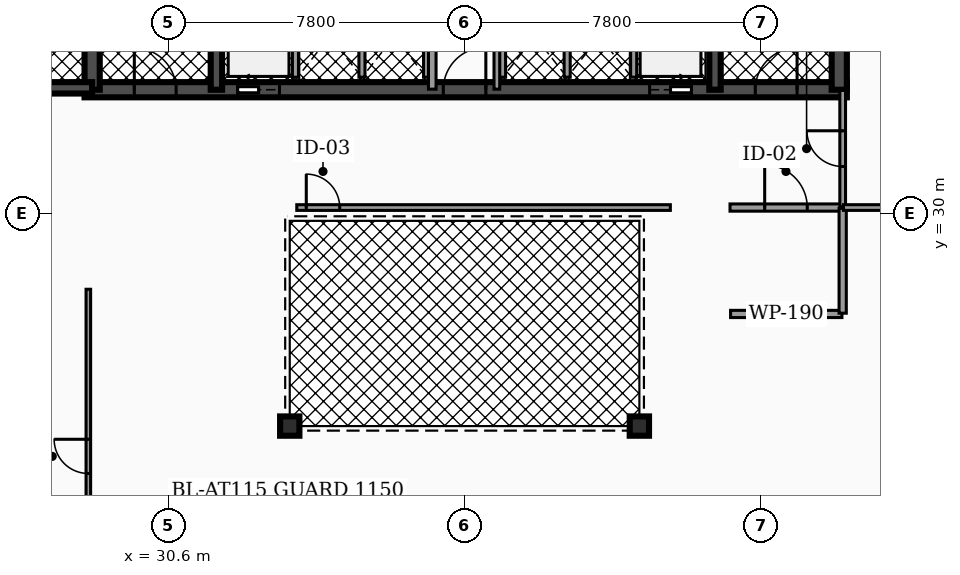
"""IFC4 building model, lengths in metres.
Left out: names, types, materials, properties, quantities, classifications, styles, units other than length and angle.
Written with IfcOpenShell. Run it as: python <this file> out.ifc"""

import sys

from ifc_helpers import new_model, si_unit, direction, frame, frame_2d, origin, origin_2d, place, context, subcontext, project, spatial, rectangle, hollow_circle, extrude, element, fill, save


model = new_model("IFC4")
c1 = context("Model", 3, precision=1e-05, world=origin(), true_north=direction((0.0, 1.0)))
c2 = subcontext(c1, "Body", "Model", "MODEL_VIEW")
j1 = project(units=[si_unit("LENGTHUNIT", "METRE"), si_unit("PLANEANGLEUNIT", "RADIAN")], contexts=[c1])
p1 = place(None, origin())
s1 = spatial("IfcSite", under=j1, at=p1, CompositionType="ELEMENT")
p2 = place(p1, origin())
s2 = spatial("IfcBuilding", under=s1, at=p2, CompositionType="ELEMENT")
p3 = place(p2, frame((0.0, 0.0, 35.7)))
s3 = spatial("IfcBuildingStorey", under=s2, at=p3, CompositionType="ELEMENT", Elevation=35.7)
p4 = place(p3, frame((28.4, 33.25, 0.0), z_axis=(0.0, 0.0, 1.0), x_axis=(1.0, 0.0, 0.0)))
e1 = element("IfcWall", 1, at=p4, inside=s3, PredefinedType="SHEAR", context=c2, shape_type="SweptSolid", body=[
    extrude(rectangle(XDim=20.06, YDim=0.4, at=frame_2d((10.03, 0.0))), origin(), (0.0, 0.0, 1.0), 3.82),
])
p5 = place(p4, frame((4.03, 0.0, 0.0)))
e2 = element("IfcOpeningElement", 2, at=p5, cuts=e1, PredefinedType="OPENING", context=c2, shape_type="SweptSolid", body=[
    extrude(rectangle(XDim=1.1, YDim=2.15, at=frame_2d((0.55, 1.075))), frame((0.0, 0.21, 0.0), z_axis=(0.0, -1.0, 0.0), x_axis=(1.0, 0.0, 0.0)), (0.0, 0.0, 1.0), 0.42),
])
p6 = place(p4, frame((14.87, 0.0, 0.0)))
e3 = element("IfcOpeningElement", 3, at=p6, cuts=e1, PredefinedType="OPENING", context=c2, shape_type="SweptSolid", body=[
    extrude(rectangle(XDim=1.1, YDim=2.15, at=frame_2d((0.55, 1.075))), frame((0.0, 0.21, 0.0), z_axis=(0.0, -1.0, 0.0), x_axis=(1.0, 0.0, 0.0)), (0.0, 0.0, 1.0), 0.42),
])
p7 = place(p4, frame((1.31, 0.0, 0.0)))
e4 = element("IfcOpeningElement", 4, at=p7, cuts=e1, PredefinedType="OPENING", context=c2, shape_type="SweptSolid", body=[
    extrude(rectangle(XDim=1.1, YDim=2.2, at=frame_2d((0.55, 1.1))), frame((0.0, 0.21, 0.0), z_axis=(0.0, -1.0, 0.0), x_axis=(1.0, 0.0, 0.0)), (0.0, 0.0, 1.0), 0.42),
])
p8 = place(p4, frame((9.44, 0.0, 0.0)))
e5 = element("IfcOpeningElement", 5, at=p8, cuts=e1, PredefinedType="OPENING", context=c2, shape_type="SweptSolid", body=[
    extrude(rectangle(XDim=1.12, YDim=2.05, at=frame_2d((0.56, 1.025))), frame((0.0, 0.21, 0.0), z_axis=(0.0, -1.0, 0.0), x_axis=(1.0, 0.0, 0.0)), (0.0, 0.0, 1.0), 0.42),
])
p9 = place(p4, frame((17.65, 0.0, 0.0)))
e6 = element("IfcOpeningElement", 6, at=p9, cuts=e1, PredefinedType="OPENING", context=c2, shape_type="SweptSolid", body=[
    extrude(rectangle(XDim=1.1, YDim=2.2, at=frame_2d((0.55, 1.1))), frame((0.0, 0.21, 0.0), z_axis=(0.0, -1.0, 0.0), x_axis=(1.0, 0.0, 0.0)), (0.0, 0.0, 1.0), 0.42),
])
p10 = place(p3, frame((28.6, 33.25, 0.0), z_axis=(0.0, 0.0, 1.0), x_axis=(0.0, 1.0, 0.0)))
e7 = element("IfcWall", 7, at=p10, inside=s3, PredefinedType="SHEAR", context=c2, shape_type="SweptSolid", body=[
    extrude(rectangle(XDim=10.2, YDim=0.4, at=frame_2d((5.1, 0.0))), origin(), (0.0, 0.0, 1.0), 3.82),
])
for number, where, z_axis, x_axis in (
    (8, (31.87, 33.25, 0.0), (0.0, 0.0, 1.0), (0.0, 1.0, 0.0)),
    (9, (44.99, 33.25, 0.0), (0.0, 0.0, 1.0), (0.0, 1.0, 0.0)),
):
    element("IfcWall", number, at=place(p3, frame(where, z_axis=z_axis, x_axis=x_axis)), inside=s3, PredefinedType="SHEAR", context=c2, shape_type="SweptSolid", body=[
        extrude(rectangle(XDim=10.2, YDim=0.3, at=frame_2d((5.1, 0.0))), origin(), (0.0, 0.0, 1.0), 3.82),
    ])
p11 = place(p3, frame((48.26, 33.25, 0.0), z_axis=(0.0, 0.0, 1.0), x_axis=(0.0, 1.0, 0.0)))
e10 = element("IfcWall", 10, at=p11, inside=s3, PredefinedType="SHEAR", context=c2, shape_type="SweptSolid", body=[
    extrude(rectangle(XDim=10.2, YDim=0.4, at=frame_2d((5.1, 0.0))), origin(), (0.0, 0.0, 1.0), 3.82),
])
p12 = place(p3, frame((25.08, 33.3, 0.0), z_axis=(0.0, 0.0, 1.0), x_axis=(1.0, 0.0, 0.0)))
e11 = element("IfcWall", 11, at=p12, inside=s3, PredefinedType="SHEAR", context=c2, shape_type="SweptSolid", body=[
    extrude(rectangle(XDim=3.52, YDim=0.3, at=frame_2d((1.76, 0.0))), origin(), (0.0, 0.0, 1.0), 3.82),
])
p13 = place(p12, frame((1.335, 0.0, 0.0)))
e12 = element("IfcOpeningElement", 12, at=p13, cuts=e11, PredefinedType="OPENING", context=c2, shape_type="SweptSolid", body=[
    extrude(rectangle(XDim=0.95, YDim=2.2, at=frame_2d((0.475, 1.1))), frame((0.0, 0.16, 0.0), z_axis=(0.0, -1.0, 0.0), x_axis=(1.0, 0.0, 0.0)), (0.0, 0.0, 1.0), 0.32),
])
for number, where, z_axis, x_axis in (
    (13, (33.8, 24.4, 0.0), (0.0, 0.0, 1.0), (1.0, 0.0, 0.0)),
    (14, (43.0, 24.4, 0.0), (0.0, 0.0, 1.0), (1.0, 0.0, 0.0)),
):
    element("IfcColumn", number, at=place(p3, frame(where, z_axis=z_axis, x_axis=x_axis)), inside=s3, PredefinedType="COLUMN", context=c2, shape_type="SweptSolid", body=[
        extrude(hollow_circle(Radius=0.254, WallThickness=0.02, at=origin_2d()), origin(), (0.0, 0.0, 1.0), 3.82),
    ])
for number, where, z_axis, x_axis in (
    (15, (33.95, 33.58, 0.0), (0.0, 0.0, 1.0), (0.0, 1.0, 0.0)),
    (16, (42.85, 33.58, 0.0), (0.0, 0.0, 1.0), (0.0, 1.0, 0.0)),
):
    element("IfcWall", number, at=place(p3, frame(where, z_axis=z_axis, x_axis=x_axis)), inside=s3, PredefinedType="SOLIDWALL", context=c2, shape_type="SweptSolid", body=[
        extrude(rectangle(XDim=2.45, YDim=0.16, at=frame_2d((1.225, 0.0))), origin(), (0.0, 0.0, 1.0), 2.792),
    ])
for number, where, z_axis, x_axis in (
    (17, (35.7, 33.58, 0.0), (0.0, 0.0, 1.0), (0.0, 1.0, 0.0)),
    (18, (37.4, 33.58, 0.0), (0.0, 0.0, 1.0), (0.0, 1.0, 0.0)),
    (19, (39.4, 33.58, 0.0), (0.0, 0.0, 1.0), (0.0, 1.0, 0.0)),
    (20, (41.1, 33.58, 0.0), (0.0, 0.0, 1.0), (0.0, 1.0, 0.0)),
):
    element("IfcWall", number, at=place(p3, frame(where, z_axis=z_axis, x_axis=x_axis)), inside=s3, PredefinedType="SOLIDWALL", context=c2, shape_type="SweptSolid", body=[
        extrude(rectangle(XDim=2.25, YDim=0.16, at=frame_2d((1.125, 0.0))), origin(), (0.0, 0.0, 1.0), 2.792),
    ])
p14 = place(p3, frame((37.55, 33.265, 0.0), z_axis=(0.0, 0.0, 1.0), x_axis=(0.0, 1.0, 0.0)))
e21 = element("IfcWall", 21, at=p14, inside=s3, PredefinedType="PARTITIONING", context=c2, shape_type="SweptSolid", body=[
    extrude(rectangle(XDim=4.595, YDim=0.2, at=frame_2d((2.298, 0.0))), origin(), (0.0, 0.0, 1.0), 2.777),
])
p15 = place(p14, frame((3.058, 0.0, 0.0)))
e22 = element("IfcOpeningElement", 22, at=p15, cuts=e21, PredefinedType="OPENING", context=c2, shape_type="SweptSolid", body=[
    extrude(rectangle(XDim=0.88, YDim=2.05, at=frame_2d((0.44, 1.025))), frame((0.0, 0.11, 0.0), z_axis=(0.0, -1.0, 0.0), x_axis=(1.0, 0.0, 0.0)), (0.0, 0.0, 1.0), 0.22),
])
p16 = place(p3, frame((39.25, 33.265, 0.0), z_axis=(0.0, 0.0, 1.0), x_axis=(0.0, 1.0, 0.0)))
e23 = element("IfcWall", 23, at=p16, inside=s3, PredefinedType="PARTITIONING", context=c2, shape_type="SweptSolid", body=[
    extrude(rectangle(XDim=4.595, YDim=0.15, at=frame_2d((2.298, 0.0))), origin(), (0.0, 0.0, 1.0), 2.777),
])
p17 = place(p16, frame((3.028, 0.0, 0.0)))
e24 = element("IfcOpeningElement", 24, at=p17, cuts=e23, PredefinedType="OPENING", context=c2, shape_type="SweptSolid", body=[
    extrude(rectangle(XDim=0.94, YDim=2.05, at=frame_2d((0.47, 1.025))), frame((0.0, 0.085, 0.0), z_axis=(0.0, -1.0, 0.0), x_axis=(1.0, 0.0, 0.0)), (0.0, 0.0, 1.0), 0.17),
])
p18 = place(p3, frame((45.385, 30.15, 0.0), z_axis=(0.0, 0.0, 1.0), x_axis=(1.0, 0.0, 0.0)))
e25 = element("IfcWall", 25, at=p18, inside=s3, PredefinedType="PARTITIONING", context=c2, shape_type="SweptSolid", body=[
    extrude(rectangle(XDim=2.945, YDim=0.19, at=frame_2d((1.473, 0.0))), origin(), (0.0, 0.0, 1.0), 2.777),
])
p19 = place(p18, frame((0.913, 0.0, 0.0)))
e26 = element("IfcOpeningElement", 26, at=p19, cuts=e25, PredefinedType="OPENING", context=c2, shape_type="SweptSolid", body=[
    extrude(rectangle(XDim=1.12, YDim=2.05, at=frame_2d((0.56, 1.025))), frame((0.0, 0.105, 0.0), z_axis=(0.0, -1.0, 0.0), x_axis=(1.0, 0.0, 0.0)), (0.0, 0.0, 1.0), 0.21),
])
p20 = place(p3, frame((48.35, 30.17, 0.0), z_axis=(0.0, 0.0, 1.0), x_axis=(0.0, 1.0, 0.0)))
e27 = element("IfcWall", 27, at=p20, inside=s3, PredefinedType="PARTITIONING", context=c2, shape_type="SweptSolid", body=[
    extrude(rectangle(XDim=3.06, YDim=0.15, at=frame_2d((1.53, 0.0))), origin(), (0.0, 0.0, 1.0), 2.777),
])
p21 = place(p20, frame((1.06, 0.0, 0.0)))
e28 = element("IfcOpeningElement", 28, at=p21, cuts=e27, PredefinedType="OPENING", context=c2, shape_type="SweptSolid", body=[
    extrude(rectangle(XDim=0.94, YDim=2.05, at=frame_2d((0.47, 1.025))), frame((0.0, 0.085, 0.0), z_axis=(0.0, -1.0, 0.0), x_axis=(1.0, 0.0, 0.0)), (0.0, 0.0, 1.0), 0.17),
])
p22 = place(p3, frame((33.985, 30.15, 0.0), z_axis=(0.0, 0.0, 1.0), x_axis=(1.0, 0.0, 0.0)))
e29 = element("IfcWall", 29, at=p22, inside=s3, PredefinedType="PARTITIONING", context=c2, shape_type="SweptSolid", body=[
    extrude(rectangle(XDim=9.83, YDim=0.15, at=frame_2d((4.915, 0.0))), origin(), (0.0, 0.0, 1.0), 2.777),
])
p23 = place(p22, frame((0.25, 0.0, 0.0)))
e30 = element("IfcOpeningElement", 30, at=p23, cuts=e29, PredefinedType="OPENING", context=c2, shape_type="SweptSolid", body=[
    extrude(rectangle(XDim=0.88, YDim=2.05, at=frame_2d((0.44, 1.025))), frame((0.0, 0.085, 0.0), z_axis=(0.0, -1.0, 0.0), x_axis=(1.0, 0.0, 0.0)), (0.0, 0.0, 1.0), 0.17),
])
p24 = place(p3, frame((45.4, 27.35, 0.0), z_axis=(0.0, 0.0, 1.0), x_axis=(1.0, 0.0, 0.0)))
e31 = element("IfcWall", 31, at=p24, inside=s3, PredefinedType="PARTITIONING", context=c2, shape_type="SweptSolid", body=[
    extrude(rectangle(XDim=2.93, YDim=0.19, at=frame_2d((1.465, 0.0))), origin(), (0.0, 0.0, 1.0), 2.777),
])
p25 = place(p3, frame((48.35, 27.37, 0.0), z_axis=(0.0, 0.0, 1.0), x_axis=(0.0, 1.0, 0.0)))
e32 = element("IfcWall", 32, at=p25, inside=s3, PredefinedType="PARTITIONING", context=c2, shape_type="SweptSolid", body=[
    extrude(rectangle(XDim=2.76, YDim=0.19, at=frame_2d((1.38, 0.0))), origin(), (0.0, 0.0, 1.0), 2.777),
])
p26 = place(p3, frame((48.37, 30.15, 0.0), z_axis=(0.0, 0.0, 1.0), x_axis=(1.0, 0.0, 0.0)))
e33 = element("IfcWall", 33, at=p26, inside=s3, PredefinedType="PARTITIONING", context=c2, shape_type="SweptSolid", body=[
    extrude(rectangle(XDim=2.06, YDim=0.15, at=frame_2d((1.03, 0.0))), origin(), (0.0, 0.0, 1.0), 2.777),
])
p27 = place(p3, frame((28.5, 19.205, 0.0), z_axis=(0.0, 0.0, 1.0), x_axis=(0.0, 1.0, 0.0)))
e34 = element("IfcWall", 34, at=p27, inside=s3, PredefinedType="PARTITIONING", context=c2, shape_type="SweptSolid", body=[
    extrude(rectangle(XDim=8.795, YDim=0.12, at=frame_2d((4.397, 0.0))), origin(), (0.0, 0.0, 1.0), 2.777),
])
p28 = place(p27, frame((3.947, 0.0, 0.0)))
e35 = element("IfcOpeningElement", 35, at=p28, cuts=e34, PredefinedType="OPENING", context=c2, shape_type="SweptSolid", body=[
    extrude(rectangle(XDim=0.9, YDim=2.05, at=frame_2d((0.45, 1.025))), frame((0.0, 0.07, 0.0), z_axis=(0.0, -1.0, 0.0), x_axis=(1.0, 0.0, 0.0)), (0.0, 0.0, 1.0), 0.14),
])
p29 = place(p5, origin())
e36 = element("IfcDoor", 36, at=p29, inside=s3, OperationType="SLIDING_TO_LEFT", PredefinedType="DOOR", context=c2, shape_type="SweptSolid", body=[
    extrude(rectangle(XDim=1.1, YDim=2.15, at=frame_2d((0.55, 1.075))), frame((0.0, 0.025, 0.0), z_axis=(0.0, -1.0, 0.0), x_axis=(1.0, 0.0, 0.0)), (0.0, 0.0, 1.0), 0.05),
])
fill(e2, e36)
p30 = place(p6, origin())
e37 = element("IfcDoor", 37, at=p30, inside=s3, OperationType="SLIDING_TO_RIGHT", PredefinedType="DOOR", context=c2, shape_type="SweptSolid", body=[
    extrude(rectangle(XDim=1.1, YDim=2.15, at=frame_2d((0.55, 1.075))), frame((0.0, 0.025, 0.0), z_axis=(0.0, -1.0, 0.0), x_axis=(1.0, 0.0, 0.0)), (0.0, 0.0, 1.0), 0.05),
])
fill(e3, e37)
p31 = place(p7, origin())
e38 = element("IfcDoor", 38, at=p31, inside=s3, OperationType="SINGLE_SWING_LEFT", PredefinedType="DOOR", context=c2, shape_type="SweptSolid", body=[
    extrude(rectangle(XDim=1.1, YDim=2.2, at=frame_2d((0.55, 1.1))), frame((0.0, 0.025, 0.0), z_axis=(0.0, -1.0, 0.0), x_axis=(1.0, 0.0, 0.0)), (0.0, 0.0, 1.0), 0.05),
])
fill(e4, e38)
p32 = place(p8, origin())
e39 = element("IfcDoor", 39, at=p32, inside=s3, OperationType="SINGLE_SWING_RIGHT", PredefinedType="DOOR", context=c2, shape_type="SweptSolid", body=[
    extrude(rectangle(XDim=1.12, YDim=2.05, at=frame_2d((0.56, 1.025))), frame((0.0, 0.025, 0.0), z_axis=(0.0, -1.0, 0.0), x_axis=(1.0, 0.0, 0.0)), (0.0, 0.0, 1.0), 0.05),
])
fill(e5, e39)
p33 = place(p9, origin())
e40 = element("IfcDoor", 40, at=p33, inside=s3, OperationType="SINGLE_SWING_RIGHT", PredefinedType="DOOR", context=c2, shape_type="SweptSolid", body=[
    extrude(rectangle(XDim=1.1, YDim=2.2, at=frame_2d((0.55, 1.1))), frame((0.0, 0.025, 0.0), z_axis=(0.0, -1.0, 0.0), x_axis=(1.0, 0.0, 0.0)), (0.0, 0.0, 1.0), 0.05),
])
fill(e6, e40)
p34 = place(p19, origin())
e41 = element("IfcDoor", 41, at=p34, inside=s3, OperationType="SINGLE_SWING_LEFT", PredefinedType="DOOR", context=c2, shape_type="SweptSolid", body=[
    extrude(rectangle(XDim=1.12, YDim=2.05, at=frame_2d((0.56, 1.025))), frame((0.0, 0.025, 0.0), z_axis=(0.0, -1.0, 0.0), x_axis=(1.0, 0.0, 0.0)), (0.0, 0.0, 1.0), 0.05),
])
fill(e26, e41)
p35 = place(p21, origin())
e42 = element("IfcDoor", 42, at=p35, inside=s3, OperationType="SINGLE_SWING_RIGHT", PredefinedType="DOOR", context=c2, shape_type="SweptSolid", body=[
    extrude(rectangle(XDim=0.94, YDim=2.05, at=frame_2d((0.47, 1.025))), frame((0.0, 0.025, 0.0), z_axis=(0.0, -1.0, 0.0), x_axis=(1.0, 0.0, 0.0)), (0.0, 0.0, 1.0), 0.05),
])
fill(e28, e42)
p36 = place(p23, origin())
e43 = element("IfcDoor", 43, at=p36, inside=s3, OperationType="SINGLE_SWING_LEFT", PredefinedType="DOOR", context=c2, shape_type="SweptSolid", body=[
    extrude(rectangle(XDim=0.88, YDim=2.05, at=frame_2d((0.44, 1.025))), frame((0.0, 0.025, 0.0), z_axis=(0.0, -1.0, 0.0), x_axis=(1.0, 0.0, 0.0)), (0.0, 0.0, 1.0), 0.05),
])
fill(e30, e43)
p37 = place(p28, origin())
e44 = element("IfcDoor", 44, at=p37, inside=s3, OperationType="SINGLE_SWING_RIGHT", PredefinedType="DOOR", context=c2, shape_type="SweptSolid", body=[
    extrude(rectangle(XDim=0.9, YDim=2.05, at=frame_2d((0.45, 1.025))), frame((0.0, 0.025, 0.0), z_axis=(0.0, -1.0, 0.0), x_axis=(1.0, 0.0, 0.0)), (0.0, 0.0, 1.0), 0.05),
])
fill(e35, e44)
save(model, sys.argv[1])
